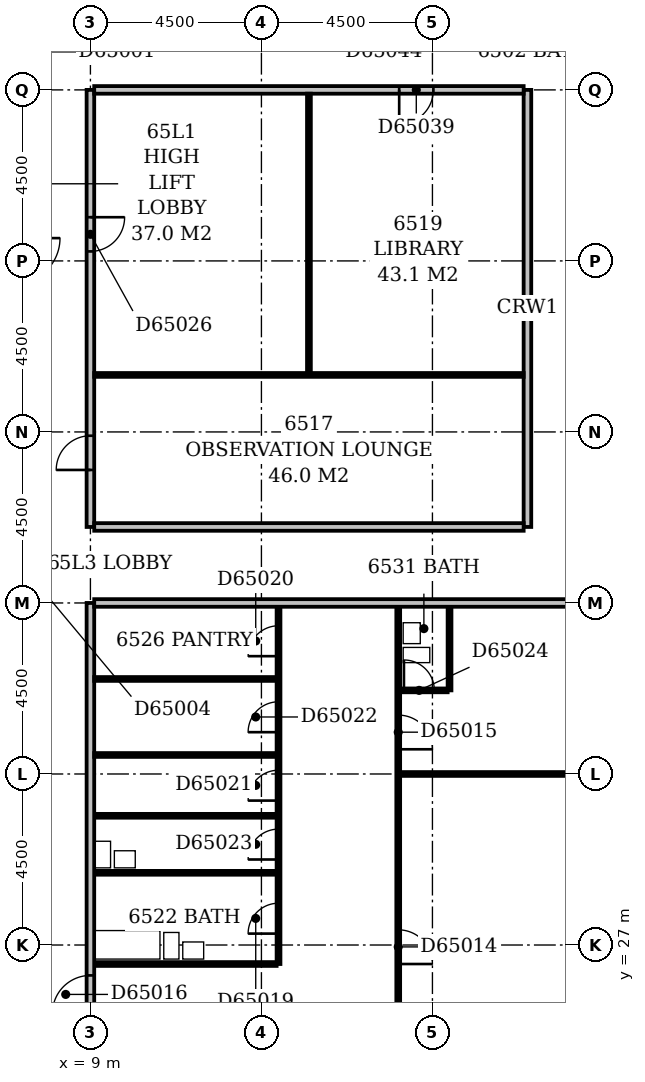
"""IFC4 building model, lengths in metres.
Left out: names, types, materials, properties, quantities, classifications, styles, units other than length and angle.
Written with IfcOpenShell. Run it as: python <this file> out.ifc"""

import sys

from ifc_helpers import new_model, si_unit, direction, frame, frame_2d, origin, place, context, subcontext, project, spatial, rectangle, extrude, element, fill, save


model = new_model("IFC4")
c1 = context("Model", 3, precision=1e-05, world=origin(), true_north=direction((0.0, 1.0)))
c2 = subcontext(c1, "Body", "Model", "MODEL_VIEW")
j1 = project(units=[si_unit("LENGTHUNIT", "METRE"), si_unit("PLANEANGLEUNIT", "RADIAN")], contexts=[c1])
p1 = place(None, origin())
s1 = spatial("IfcSite", under=j1, at=p1, CompositionType="ELEMENT")
p2 = place(p1, origin())
s2 = spatial("IfcBuilding", under=s1, at=p2, CompositionType="ELEMENT")
p3 = place(p2, frame((0.0, 0.0, 251.0)))
s3 = spatial("IfcBuildingStorey", under=s2, at=p3, CompositionType="ELEMENT", Elevation=251.0)
p4 = place(p3, frame((17.1, 17.4, 0.0), z_axis=(0.0, 0.0, 1.0), x_axis=(0.0, 1.0, 0.0)))
e1 = element("IfcWall", 1, at=p4, inside=s3, PredefinedType="PARTITIONING", context=c2, shape_type="SweptSolid", body=[
    extrude(rectangle(XDim=18.5, YDim=0.1, at=frame_2d((9.25, 0.0))), origin(), (0.0, 0.0, 1.0), 3.3),
])
p5 = place(p4, frame((3.55, 0.0, 0.0)))
e2 = element("IfcOpeningElement", 2, at=p5, cuts=e1, PredefinedType="OPENING", context=c2, shape_type="SweptSolid", body=[
    extrude(rectangle(XDim=0.9, YDim=2.1, at=frame_2d((0.45, 1.05))), frame((0.0, 0.062, 0.0), z_axis=(0.0, -1.0, 0.0), x_axis=(1.0, 0.0, 0.0)), (0.0, 0.0, 1.0), 0.124),
])
p6 = place(p4, frame((9.1, 0.0, 0.0)))
e3 = element("IfcOpeningElement", 3, at=p6, cuts=e1, PredefinedType="OPENING", context=c2, shape_type="SweptSolid", body=[
    extrude(rectangle(XDim=0.9, YDim=2.1, at=frame_2d((0.45, 1.05))), frame((0.0, 0.062, 0.0), z_axis=(0.0, -1.0, 0.0), x_axis=(1.0, 0.0, 0.0)), (0.0, 0.0, 1.0), 0.124),
])
p7 = place(p4, frame((14.75, 0.0, 0.0)))
e4 = element("IfcOpeningElement", 4, at=p7, cuts=e1, PredefinedType="OPENING", context=c2, shape_type="SweptSolid", body=[
    extrude(rectangle(XDim=0.9, YDim=2.1, at=frame_2d((0.45, 1.05))), frame((0.0, 0.062, 0.0), z_axis=(0.0, -1.0, 0.0), x_axis=(1.0, 0.0, 0.0)), (0.0, 0.0, 1.0), 0.124),
])
p8 = place(p3, frame((9.0, 18.45, 0.0), z_axis=(0.0, 0.0, 1.0), x_axis=(0.0, 1.0, 0.0)))
e5 = element("IfcWall", 5, at=p8, inside=s3, PredefinedType="PARTITIONING", context=c2, shape_type="SweptSolid", body=[
    extrude(rectangle(XDim=17.55, YDim=0.2, at=frame_2d((8.775, 0.0))), origin(), (0.0, 0.0, 1.0), 3.3),
])
p9 = place(p8, frame((6.75, 0.0, 0.0)))
e6 = element("IfcOpeningElement", 6, at=p9, cuts=e5, PredefinedType="OPENING", context=c2, shape_type="SweptSolid", body=[
    extrude(rectangle(XDim=1.0, YDim=2.1, at=frame_2d((0.5, 1.05))), frame((0.0, 0.112, 0.0), z_axis=(0.0, -1.0, 0.0), x_axis=(1.0, 0.0, 0.0)), (0.0, 0.0, 1.0), 0.224),
])
p10 = place(p3, frame((9.1, 26.5, 0.0), z_axis=(0.0, 0.0, 1.0), x_axis=(1.0, 0.0, 0.0)))
e7 = element("IfcWall", 7, at=p10, inside=s3, PredefinedType="PLUMBINGWALL", context=c2, shape_type="SweptSolid", body=[
    extrude(rectangle(XDim=4.8, YDim=0.1, at=frame_2d((2.4, 0.0))), origin(), (0.0, 0.0, 1.0), 2.7),
])
p11 = place(p3, frame((13.95, 26.5, 0.0), z_axis=(0.0, 0.0, 1.0), x_axis=(0.0, 1.0, 0.0)))
e8 = element("IfcWall", 8, at=p11, inside=s3, PredefinedType="PARTITIONING", context=c2, shape_type="SweptSolid", body=[
    extrude(rectangle(XDim=9.4, YDim=0.1, at=frame_2d((4.7, 0.0))), origin(), (0.0, 0.0, 1.0), 3.3),
])
p12 = place(p11, frame((0.8, 0.0, 0.0)))
e9 = element("IfcOpeningElement", 9, at=p12, cuts=e8, PredefinedType="OPENING", context=c2, shape_type="SweptSolid", body=[
    extrude(rectangle(XDim=0.8, YDim=2.1, at=frame_2d((0.4, 1.05))), frame((0.0, 0.062, 0.0), z_axis=(0.0, -1.0, 0.0), x_axis=(1.0, 0.0, 0.0)), (0.0, 0.0, 1.0), 0.124),
])
p13 = place(p11, frame((8.1, 0.0, 0.0)))
e10 = element("IfcOpeningElement", 10, at=p13, cuts=e8, PredefinedType="OPENING", context=c2, shape_type="SweptSolid", body=[
    extrude(rectangle(XDim=0.8, YDim=2.1, at=frame_2d((0.4, 1.05))), frame((0.0, 0.062, 0.0), z_axis=(0.0, -1.0, 0.0), x_axis=(1.0, 0.0, 0.0)), (0.0, 0.0, 1.0), 0.124),
])
p14 = place(p11, frame((4.3, 0.0, 0.0)))
e11 = element("IfcOpeningElement", 11, at=p14, cuts=e8, PredefinedType="OPENING", context=c2, shape_type="SweptSolid", body=[
    extrude(rectangle(XDim=0.8, YDim=2.1, at=frame_2d((0.4, 1.05))), frame((0.0, 0.062, 0.0), z_axis=(0.0, -1.0, 0.0), x_axis=(1.0, 0.0, 0.0)), (0.0, 0.0, 1.0), 0.124),
])
p15 = place(p11, frame((6.1, 0.0, 0.0)))
e12 = element("IfcOpeningElement", 12, at=p15, cuts=e8, PredefinedType="OPENING", context=c2, shape_type="SweptSolid", body=[
    extrude(rectangle(XDim=0.8, YDim=2.1, at=frame_2d((0.4, 1.05))), frame((0.0, 0.062, 0.0), z_axis=(0.0, -1.0, 0.0), x_axis=(1.0, 0.0, 0.0)), (0.0, 0.0, 1.0), 0.124),
])
p16 = place(p11, frame((2.75, 0.0, 0.0)))
e13 = element("IfcOpeningElement", 13, at=p16, cuts=e8, PredefinedType="OPENING", context=c2, shape_type="SweptSolid", body=[
    extrude(rectangle(XDim=0.8, YDim=2.1, at=frame_2d((0.4, 1.05))), frame((0.0, 0.062, 0.0), z_axis=(0.0, -1.0, 0.0), x_axis=(1.0, 0.0, 0.0)), (0.0, 0.0, 1.0), 0.124),
])
for number, where, z_axis, x_axis in (
    (14, (9.1, 28.9, 0.0), (0.0, 0.0, 1.0), (1.0, 0.0, 0.0)),
    (15, (9.1, 30.4, 0.0), (0.0, 0.0, 1.0), (1.0, 0.0, 0.0)),
):
    element("IfcWall", number, at=place(p3, frame(where, z_axis=z_axis, x_axis=x_axis)), inside=s3, PredefinedType="PLUMBINGWALL", context=c2, shape_type="SweptSolid", body=[
        extrude(rectangle(XDim=4.8, YDim=0.1, at=frame_2d((2.4, 0.0))), origin(), (0.0, 0.0, 1.0), 3.3),
    ])
p17 = place(p3, frame((17.15, 31.5, 0.0), z_axis=(0.0, 0.0, 1.0), x_axis=(1.0, 0.0, 0.0)))
e16 = element("IfcWall", 16, at=p17, inside=s3, PredefinedType="PARTITIONING", context=c2, shape_type="SweptSolid", body=[
    extrude(rectangle(XDim=4.9, YDim=0.1, at=frame_2d((2.45, 0.0))), origin(), (0.0, 0.0, 1.0), 3.3),
])
p18 = place(p3, frame((9.1, 32.0, 0.0), z_axis=(0.0, 0.0, 1.0), x_axis=(1.0, 0.0, 0.0)))
e17 = element("IfcWall", 17, at=p18, inside=s3, PredefinedType="PARTITIONING", context=c2, shape_type="SweptSolid", body=[
    extrude(rectangle(XDim=4.8, YDim=0.1, at=frame_2d((2.4, 0.0))), origin(), (0.0, 0.0, 1.0), 3.3),
])
p19 = place(p3, frame((17.15, 33.7, 0.0), z_axis=(0.0, 0.0, 1.0), x_axis=(1.0, 0.0, 0.0)))
e18 = element("IfcWall", 18, at=p19, inside=s3, PredefinedType="PLUMBINGWALL", context=c2, shape_type="SweptSolid", body=[
    extrude(rectangle(XDim=1.25, YDim=0.1, at=frame_2d((0.625, 0.0))), origin(), (0.0, 0.0, 1.0), 3.3),
])
p20 = place(p19, frame((0.1, 0.0, 0.0)))
e19 = element("IfcOpeningElement", 19, at=p20, cuts=e18, PredefinedType="OPENING", context=c2, shape_type="SweptSolid", body=[
    extrude(rectangle(XDim=0.8, YDim=2.1, at=frame_2d((0.4, 1.05))), frame((0.0, 0.062, 0.0), z_axis=(0.0, -1.0, 0.0), x_axis=(1.0, 0.0, 0.0)), (0.0, 0.0, 1.0), 0.124),
])
p21 = place(p3, frame((18.45, 33.7, 0.0), z_axis=(0.0, 0.0, 1.0), x_axis=(0.0, 1.0, 0.0)))
e20 = element("IfcWall", 20, at=p21, inside=s3, PredefinedType="PLUMBINGWALL", context=c2, shape_type="SweptSolid", body=[
    extrude(rectangle(XDim=2.2, YDim=0.1, at=frame_2d((1.1, 0.0))), origin(), (0.0, 0.0, 1.0), 3.3),
])
p22 = place(p3, frame((9.1, 34.0, 0.0), z_axis=(0.0, 0.0, 1.0), x_axis=(1.0, 0.0, 0.0)))
e21 = element("IfcWall", 21, at=p22, inside=s3, PredefinedType="PARTITIONING", context=c2, shape_type="SweptSolid", body=[
    extrude(rectangle(XDim=4.8, YDim=0.1, at=frame_2d((2.4, 0.0))), origin(), (0.0, 0.0, 1.0), 3.3),
])
p23 = place(p3, frame((9.1, 36.0, 0.0), z_axis=(0.0, 0.0, 1.0), x_axis=(1.0, 0.0, 0.0)))
e22 = element("IfcWall", 22, at=p23, inside=s3, PredefinedType="PARTITIONING", context=c2, shape_type="SweptSolid", body=[
    extrude(rectangle(XDim=12.95, YDim=0.2, at=frame_2d((6.475, 0.0))), origin(), (0.0, 0.0, 1.0), 3.3),
])
p24 = place(p3, frame((9.0, 38.0, 0.0), z_axis=(0.0, 0.0, 1.0), x_axis=(0.0, 1.0, 0.0)))
e23 = element("IfcWall", 23, at=p24, inside=s3, PredefinedType="PARTITIONING", context=c2, shape_type="SweptSolid", body=[
    extrude(rectangle(XDim=11.5, YDim=0.2, at=frame_2d((5.75, 0.0))), origin(), (0.0, 0.0, 1.0), 3.3),
])
p25 = place(p24, frame((1.5, 0.0, 0.0)))
e24 = element("IfcOpeningElement", 24, at=p25, cuts=e23, PredefinedType="OPENING", context=c2, shape_type="SweptSolid", body=[
    extrude(rectangle(XDim=0.9, YDim=2.1, at=frame_2d((0.45, 1.05))), frame((0.0, 0.112, 0.0), z_axis=(0.0, -1.0, 0.0), x_axis=(1.0, 0.0, 0.0)), (0.0, 0.0, 1.0), 0.224),
])
p26 = place(p24, frame((7.25, 0.0, 0.0)))
e25 = element("IfcOpeningElement", 25, at=p26, cuts=e23, PredefinedType="OPENING", context=c2, shape_type="SweptSolid", body=[
    extrude(rectangle(XDim=0.9, YDim=2.1, at=frame_2d((0.45, 1.05))), frame((0.0, 0.112, 0.0), z_axis=(0.0, -1.0, 0.0), x_axis=(1.0, 0.0, 0.0)), (0.0, 0.0, 1.0), 0.224),
])
p27 = place(p3, frame((9.1, 38.0, 0.0), z_axis=(0.0, 0.0, 1.0), x_axis=(1.0, 0.0, 0.0)))
e26 = element("IfcWall", 26, at=p27, inside=s3, PredefinedType="PARTITIONING", context=c2, shape_type="SweptSolid", body=[
    extrude(rectangle(XDim=11.3, YDim=0.2, at=frame_2d((5.65, 0.0))), origin(), (0.0, 0.0, 1.0), 3.3),
])
p28 = place(p3, frame((20.5, 38.0, 0.0), z_axis=(0.0, 0.0, 1.0), x_axis=(0.0, 1.0, 0.0)))
e27 = element("IfcWall", 27, at=p28, inside=s3, PredefinedType="PARTITIONING", context=c2, shape_type="SweptSolid", body=[
    extrude(rectangle(XDim=11.5, YDim=0.2, at=frame_2d((5.75, 0.0))), origin(), (0.0, 0.0, 1.0), 3.3),
])
p29 = place(p3, frame((9.1, 42.0, 0.0), z_axis=(0.0, 0.0, 1.0), x_axis=(1.0, 0.0, 0.0)))
e28 = element("IfcWall", 28, at=p29, inside=s3, PredefinedType="PARTITIONING", context=c2, shape_type="SweptSolid", body=[
    extrude(rectangle(XDim=11.3, YDim=0.1, at=frame_2d((5.65, 0.0))), origin(), (0.0, 0.0, 1.0), 3.3),
])
p30 = place(p3, frame((14.75, 42.05, 0.0), z_axis=(0.0, 0.0, 1.0), x_axis=(0.0, 1.0, 0.0)))
e29 = element("IfcWall", 29, at=p30, inside=s3, PredefinedType="PARTITIONING", context=c2, shape_type="SweptSolid", body=[
    extrude(rectangle(XDim=7.35, YDim=0.1, at=frame_2d((3.675, 0.0))), origin(), (0.0, 0.0, 1.0), 3.3),
])
p31 = place(p3, frame((9.1, 49.5, 0.0), z_axis=(0.0, 0.0, 1.0), x_axis=(1.0, 0.0, 0.0)))
e30 = element("IfcWall", 30, at=p31, inside=s3, PredefinedType="PARTITIONING", context=c2, shape_type="SweptSolid", body=[
    extrude(rectangle(XDim=11.3, YDim=0.2, at=frame_2d((5.65, 0.0))), origin(), (0.0, 0.0, 1.0), 3.3),
])
p32 = place(p31, frame((8.025, 0.0, 0.0)))
e31 = element("IfcOpeningElement", 31, at=p32, cuts=e30, PredefinedType="OPENING", context=c2, shape_type="SweptSolid", body=[
    extrude(rectangle(XDim=0.9, YDim=2.1, at=frame_2d((0.45, 1.05))), frame((0.0, 0.112, 0.0), z_axis=(0.0, -1.0, 0.0), x_axis=(1.0, 0.0, 0.0)), (0.0, 0.0, 1.0), 0.224),
])
p33 = place(p6, frame((0.9, 0.0, 0.0), z_axis=(0.0, 0.0, 1.0), x_axis=(-1.0, 0.0, 0.0)))
e32 = element("IfcDoor", 32, at=p33, inside=s3, OperationType="SINGLE_SWING_RIGHT", PredefinedType="DOOR", context=c2, shape_type="SweptSolid", body=[
    extrude(rectangle(XDim=0.9, YDim=2.1, at=frame_2d((0.45, 1.05))), frame((0.0, 0.025, 0.0), z_axis=(0.0, -1.0, 0.0), x_axis=(1.0, 0.0, 0.0)), (0.0, 0.0, 1.0), 0.05),
])
fill(e3, e32)
p34 = place(p7, frame((0.9, 0.0, 0.0), z_axis=(0.0, 0.0, 1.0), x_axis=(-1.0, 0.0, 0.0)))
e33 = element("IfcDoor", 33, at=p34, inside=s3, OperationType="SINGLE_SWING_RIGHT", PredefinedType="DOOR", context=c2, shape_type="SweptSolid", body=[
    extrude(rectangle(XDim=0.9, YDim=2.1, at=frame_2d((0.45, 1.05))), frame((0.0, 0.025, 0.0), z_axis=(0.0, -1.0, 0.0), x_axis=(1.0, 0.0, 0.0)), (0.0, 0.0, 1.0), 0.05),
])
fill(e4, e33)
p35 = place(p9, origin())
e34 = element("IfcDoor", 34, at=p35, inside=s3, OperationType="SINGLE_SWING_LEFT", PredefinedType="DOOR", context=c2, shape_type="SweptSolid", body=[
    extrude(rectangle(XDim=1.0, YDim=2.1, at=frame_2d((0.5, 1.05))), frame((0.0, 0.025, 0.0), z_axis=(0.0, -1.0, 0.0), x_axis=(1.0, 0.0, 0.0)), (0.0, 0.0, 1.0), 0.05),
])
fill(e6, e34)
p36 = place(p12, origin())
e35 = element("IfcDoor", 35, at=p36, inside=s3, OperationType="SINGLE_SWING_LEFT", PredefinedType="DOOR", context=c2, shape_type="SweptSolid", body=[
    extrude(rectangle(XDim=0.8, YDim=2.1, at=frame_2d((0.4, 1.05))), frame((0.0, 0.025, 0.0), z_axis=(0.0, -1.0, 0.0), x_axis=(1.0, 0.0, 0.0)), (0.0, 0.0, 1.0), 0.05),
])
fill(e9, e35)
p37 = place(p13, origin())
e36 = element("IfcDoor", 36, at=p37, inside=s3, OperationType="SINGLE_SWING_LEFT", PredefinedType="DOOR", context=c2, shape_type="SweptSolid", body=[
    extrude(rectangle(XDim=0.8, YDim=2.1, at=frame_2d((0.4, 1.05))), frame((0.0, 0.025, 0.0), z_axis=(0.0, -1.0, 0.0), x_axis=(1.0, 0.0, 0.0)), (0.0, 0.0, 1.0), 0.05),
])
fill(e10, e36)
p38 = place(p14, origin())
e37 = element("IfcDoor", 37, at=p38, inside=s3, OperationType="SINGLE_SWING_LEFT", PredefinedType="DOOR", context=c2, shape_type="SweptSolid", body=[
    extrude(rectangle(XDim=0.8, YDim=2.1, at=frame_2d((0.4, 1.05))), frame((0.0, 0.025, 0.0), z_axis=(0.0, -1.0, 0.0), x_axis=(1.0, 0.0, 0.0)), (0.0, 0.0, 1.0), 0.05),
])
fill(e11, e37)
p39 = place(p15, origin())
e38 = element("IfcDoor", 38, at=p39, inside=s3, OperationType="SINGLE_SWING_LEFT", PredefinedType="DOOR", context=c2, shape_type="SweptSolid", body=[
    extrude(rectangle(XDim=0.8, YDim=2.1, at=frame_2d((0.4, 1.05))), frame((0.0, 0.025, 0.0), z_axis=(0.0, -1.0, 0.0), x_axis=(1.0, 0.0, 0.0)), (0.0, 0.0, 1.0), 0.05),
])
fill(e12, e38)
p40 = place(p16, origin())
e39 = element("IfcDoor", 39, at=p40, inside=s3, OperationType="SINGLE_SWING_LEFT", PredefinedType="DOOR", context=c2, shape_type="SweptSolid", body=[
    extrude(rectangle(XDim=0.8, YDim=2.1, at=frame_2d((0.4, 1.05))), frame((0.0, 0.025, 0.0), z_axis=(0.0, -1.0, 0.0), x_axis=(1.0, 0.0, 0.0)), (0.0, 0.0, 1.0), 0.05),
])
fill(e13, e39)
p41 = place(p20, origin())
e40 = element("IfcDoor", 40, at=p41, inside=s3, OperationType="SINGLE_SWING_LEFT", PredefinedType="DOOR", context=c2, shape_type="SweptSolid", body=[
    extrude(rectangle(XDim=0.8, YDim=2.1, at=frame_2d((0.4, 1.05))), frame((0.0, 0.025, 0.0), z_axis=(0.0, -1.0, 0.0), x_axis=(1.0, 0.0, 0.0)), (0.0, 0.0, 1.0), 0.05),
])
fill(e19, e40)
p42 = place(p25, origin())
e41 = element("IfcDoor", 41, at=p42, inside=s3, OperationType="SINGLE_SWING_LEFT", PredefinedType="DOOR", context=c2, shape_type="SweptSolid", body=[
    extrude(rectangle(XDim=0.9, YDim=2.1, at=frame_2d((0.45, 1.05))), frame((0.0, 0.025, 0.0), z_axis=(0.0, -1.0, 0.0), x_axis=(1.0, 0.0, 0.0)), (0.0, 0.0, 1.0), 0.05),
])
fill(e24, e41)
p43 = place(p26, origin())
e42 = element("IfcDoor", 42, at=p43, inside=s3, OperationType="SINGLE_SWING_RIGHT", PredefinedType="DOOR", context=c2, shape_type="SweptSolid", body=[
    extrude(rectangle(XDim=0.9, YDim=2.1, at=frame_2d((0.45, 1.05))), frame((0.0, 0.025, 0.0), z_axis=(0.0, -1.0, 0.0), x_axis=(1.0, 0.0, 0.0)), (0.0, 0.0, 1.0), 0.05),
])
fill(e25, e42)
p44 = place(p32, frame((0.9, 0.0, 0.0), z_axis=(0.0, 0.0, 1.0), x_axis=(-1.0, 0.0, 0.0)))
e43 = element("IfcDoor", 43, at=p44, inside=s3, OperationType="SINGLE_SWING_RIGHT", PredefinedType="DOOR", context=c2, shape_type="SweptSolid", body=[
    extrude(rectangle(XDim=0.9, YDim=2.1, at=frame_2d((0.45, 1.05))), frame((0.0, 0.025, 0.0), z_axis=(0.0, -1.0, 0.0), x_axis=(1.0, 0.0, 0.0)), (0.0, 0.0, 1.0), 0.05),
])
fill(e31, e43)
save(model, sys.argv[1])
